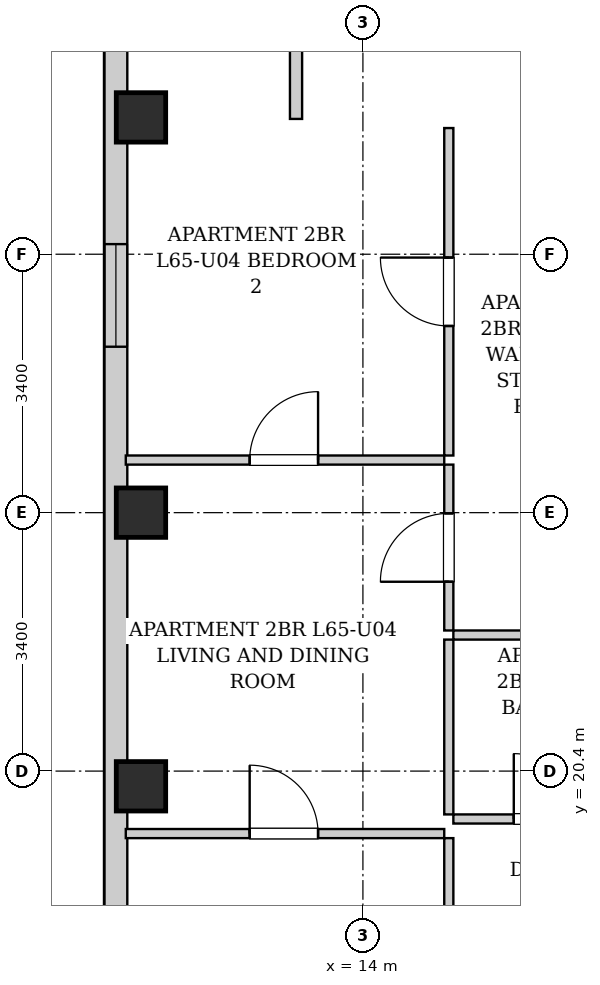
"""IFC4 building model, lengths in metres.
Left out: names, types, materials, properties, quantities, classifications, styles, units other than length and angle.
Written with IfcOpenShell. Run it as: python <this file> out.ifc"""

import sys

from ifc_helpers import new_model, si_unit, direction, frame, frame_2d, origin, origin_2d, place, context, subcontext, project, spatial, rectangle, extrude, element, fill, save


model = new_model("IFC4")
c1 = context("Model", 3, precision=1e-05, world=origin(), true_north=direction((0.0, 1.0)))
c2 = subcontext(c1, "Body", "Model", "MODEL_VIEW")
j1 = project(units=[si_unit("LENGTHUNIT", "METRE"), si_unit("PLANEANGLEUNIT", "RADIAN")], contexts=[c1])
p1 = place(None, origin())
s1 = spatial("IfcSite", under=j1, at=p1, CompositionType="ELEMENT")
p2 = place(p1, origin())
s2 = spatial("IfcBuilding", under=s1, at=p2, CompositionType="ELEMENT")
p3 = place(p2, frame((0.0, 0.0, 224.1)))
s3 = spatial("IfcBuildingStorey", under=s2, at=p3, CompositionType="ELEMENT", Elevation=224.1)
for number, where, z_axis, x_axis in (
    (1, (11.08, 20.2, 0.0), (0.0, 0.0, 1.0), (1.0, 0.0, 0.0)),
    (2, (11.08, 23.8, 0.0), (0.0, 0.0, 1.0), (1.0, 0.0, 0.0)),
    (3, (11.08, 29.0, 0.0), (0.0, 0.0, 1.0), (1.0, 0.0, 0.0)),
):
    element("IfcColumn", number, at=place(p3, frame(where, z_axis=z_axis, x_axis=x_axis)), inside=s3, PredefinedType="COLUMN", context=c2, shape_type="SweptSolid", body=[
        extrude(rectangle(XDim=0.65, YDim=0.65, at=origin_2d()), origin(), (0.0, 0.0, 1.0), 3.4),
    ])
p4 = place(p3, frame((10.75, 6.3, 0.0), z_axis=(0.0, 0.0, 1.0), x_axis=(0.0, 1.0, 0.0)))
e4 = element("IfcWall", 4, at=p4, inside=s3, PredefinedType="SOLIDWALL", context=c2, shape_type="SweptSolid", body=[
    extrude(rectangle(XDim=31.4, YDim=0.3, at=frame_2d((15.7, 0.0))), origin(), (0.0, 0.0, 1.0), 3.14),
])
p5 = place(p4, frame((1.653, 0.0, 0.55)))
e5 = element("IfcOpeningElement", 5, at=p5, cuts=e4, PredefinedType="OPENING", context=c2, shape_type="SweptSolid", body=[
    extrude(rectangle(XDim=1.35, YDim=1.2, at=frame_2d((0.675, 0.6))), frame((0.0, 0.16, 0.0), z_axis=(0.0, -1.0, 0.0), x_axis=(1.0, 0.0, 0.0)), (0.0, 0.0, 1.0), 0.32),
])
p6 = place(p4, frame((10.367, 0.0, 0.55)))
e6 = element("IfcOpeningElement", 6, at=p6, cuts=e4, PredefinedType="OPENING", context=c2, shape_type="SweptSolid", body=[
    extrude(rectangle(XDim=1.35, YDim=1.2, at=frame_2d((0.675, 0.6))), frame((0.0, 0.16, 0.0), z_axis=(0.0, -1.0, 0.0), x_axis=(1.0, 0.0, 0.0)), (0.0, 0.0, 1.0), 0.32),
])
p7 = place(p4, frame((19.683, 0.0, 0.55)))
e7 = element("IfcOpeningElement", 7, at=p7, cuts=e4, PredefinedType="OPENING", context=c2, shape_type="SweptSolid", body=[
    extrude(rectangle(XDim=1.35, YDim=1.2, at=frame_2d((0.675, 0.6))), frame((0.0, 0.16, 0.0), z_axis=(0.0, -1.0, 0.0), x_axis=(1.0, 0.0, 0.0)), (0.0, 0.0, 1.0), 0.32),
])
p8 = place(p3, frame((13.12, 28.98, 0.0), z_axis=(0.0, 0.0, 1.0), x_axis=(0.0, 1.0, 0.0)))
e8 = element("IfcWall", 8, at=p8, inside=s3, PredefinedType="PARTITIONING", context=c2, shape_type="SweptSolid", body=[
    extrude(rectangle(XDim=1.58, YDim=0.16, at=frame_2d((0.79, 0.0))), origin(), (0.0, 0.0, 1.0), 3.14),
])
p9 = place(p3, frame((15.19, 22.19, 0.0), z_axis=(0.0, 0.0, 1.0), x_axis=(1.0, 0.0, 0.0)))
e9 = element("IfcWall", 9, at=p9, inside=s3, PredefinedType="PARTITIONING", context=c2, shape_type="SweptSolid", body=[
    extrude(rectangle(XDim=2.45, YDim=0.12, at=frame_2d((1.225, 0.0))), origin(), (0.0, 0.0, 1.0), 3.14),
])
p10 = place(p3, frame((15.13, 22.25, 0.0), z_axis=(0.0, 0.0, 1.0), x_axis=(0.0, 1.0, 0.0)))
e10 = element("IfcWall", 10, at=p10, inside=s3, PredefinedType="PARTITIONING", context=c2, shape_type="SweptSolid", body=[
    extrude(rectangle(XDim=2.182, YDim=0.12, at=frame_2d((1.091, 0.0))), origin(), (0.0, 0.0, 1.0), 3.14),
])
p11 = place(p10, frame((0.641, 0.0, 0.0)))
e11 = element("IfcOpeningElement", 11, at=p11, cuts=e10, PredefinedType="OPENING", context=c2, shape_type="SweptSolid", body=[
    extrude(rectangle(XDim=0.9, YDim=2.05, at=frame_2d((0.45, 1.025))), frame((0.0, 0.07, 0.0), z_axis=(0.0, -1.0, 0.0), x_axis=(1.0, 0.0, 0.0)), (0.0, 0.0, 1.0), 0.14),
])
p12 = place(p3, frame((15.13, 24.552, 0.0), z_axis=(0.0, 0.0, 1.0), x_axis=(0.0, 1.0, 0.0)))
e12 = element("IfcWall", 12, at=p12, inside=s3, PredefinedType="PARTITIONING", context=c2, shape_type="SweptSolid", body=[
    extrude(rectangle(XDim=4.308, YDim=0.12, at=frame_2d((2.154, 0.0))), origin(), (0.0, 0.0, 1.0), 3.14),
])
p13 = place(p12, frame((1.704, 0.0, 0.0)))
e13 = element("IfcOpeningElement", 13, at=p13, cuts=e12, PredefinedType="OPENING", context=c2, shape_type="SweptSolid", body=[
    extrude(rectangle(XDim=0.9, YDim=2.05, at=frame_2d((0.45, 1.025))), frame((0.0, 0.07, 0.0), z_axis=(0.0, -1.0, 0.0), x_axis=(1.0, 0.0, 0.0)), (0.0, 0.0, 1.0), 0.14),
])
p14 = place(p3, frame((15.19, 19.77, 0.0), z_axis=(0.0, 0.0, 1.0), x_axis=(1.0, 0.0, 0.0)))
e14 = element("IfcWall", 14, at=p14, inside=s3, PredefinedType="PARTITIONING", context=c2, shape_type="SweptSolid", body=[
    extrude(rectangle(XDim=2.45, YDim=0.12, at=frame_2d((1.225, 0.0))), origin(), (0.0, 0.0, 1.0), 3.14),
])
p15 = place(p14, frame((0.795, 0.0, 0.0)))
e15 = element("IfcOpeningElement", 15, at=p15, cuts=e14, PredefinedType="OPENING", context=c2, shape_type="SweptSolid", body=[
    extrude(rectangle(XDim=0.86, YDim=2.05, at=frame_2d((0.43, 1.025))), frame((0.0, 0.07, 0.0), z_axis=(0.0, -1.0, 0.0), x_axis=(1.0, 0.0, 0.0)), (0.0, 0.0, 1.0), 0.14),
])
p16 = place(p3, frame((15.13, 19.83, 0.0), z_axis=(0.0, 0.0, 1.0), x_axis=(0.0, 1.0, 0.0)))
e16 = element("IfcWall", 16, at=p16, inside=s3, PredefinedType="PARTITIONING", context=c2, shape_type="SweptSolid", body=[
    extrude(rectangle(XDim=2.3, YDim=0.12, at=frame_2d((1.15, 0.0))), origin(), (0.0, 0.0, 1.0), 3.14),
])
p17 = place(p3, frame((15.13, 15.21, 0.0), z_axis=(0.0, 0.0, 1.0), x_axis=(0.0, 1.0, 0.0)))
e17 = element("IfcWall", 17, at=p17, inside=s3, PredefinedType="PARTITIONING", context=c2, shape_type="SweptSolid", body=[
    extrude(rectangle(XDim=4.308, YDim=0.12, at=frame_2d((2.154, 0.0))), origin(), (0.0, 0.0, 1.0), 3.14),
])
p18 = place(p17, frame((1.704, 0.0, 0.0)))
e18 = element("IfcOpeningElement", 18, at=p18, cuts=e17, PredefinedType="OPENING", context=c2, shape_type="SweptSolid", body=[
    extrude(rectangle(XDim=0.9, YDim=2.05, at=frame_2d((0.45, 1.025))), frame((0.0, 0.07, 0.0), z_axis=(0.0, -1.0, 0.0), x_axis=(1.0, 0.0, 0.0)), (0.0, 0.0, 1.0), 0.14),
])
p19 = place(p3, frame((10.88, 19.578, 0.0), z_axis=(0.0, 0.0, 1.0), x_axis=(1.0, 0.0, 0.0)))
e19 = element("IfcWall", 19, at=p19, inside=s3, PredefinedType="PARTITIONING", context=c2, shape_type="SweptSolid", body=[
    extrude(rectangle(XDim=4.19, YDim=0.12, at=frame_2d((2.095, 0.0))), origin(), (0.0, 0.0, 1.0), 3.14),
])
p20 = place(p19, frame((1.63, 0.0, 0.0)))
e20 = element("IfcOpeningElement", 20, at=p20, cuts=e19, PredefinedType="OPENING", context=c2, shape_type="SweptSolid", body=[
    extrude(rectangle(XDim=0.9, YDim=2.05, at=frame_2d((0.45, 1.025))), frame((0.0, 0.07, 0.0), z_axis=(0.0, -1.0, 0.0), x_axis=(1.0, 0.0, 0.0)), (0.0, 0.0, 1.0), 0.14),
])
p21 = place(p3, frame((10.88, 24.492, 0.0), z_axis=(0.0, 0.0, 1.0), x_axis=(1.0, 0.0, 0.0)))
e21 = element("IfcWall", 21, at=p21, inside=s3, PredefinedType="PARTITIONING", context=c2, shape_type="SweptSolid", body=[
    extrude(rectangle(XDim=4.19, YDim=0.12, at=frame_2d((2.095, 0.0))), origin(), (0.0, 0.0, 1.0), 2.878),
])
p22 = place(p21, frame((1.63, 0.0, 0.0)))
e22 = element("IfcOpeningElement", 22, at=p22, cuts=e21, PredefinedType="OPENING", context=c2, shape_type="SweptSolid", body=[
    extrude(rectangle(XDim=0.9, YDim=2.05, at=frame_2d((0.45, 1.025))), frame((0.0, 0.07, 0.0), z_axis=(0.0, -1.0, 0.0), x_axis=(1.0, 0.0, 0.0)), (0.0, 0.0, 1.0), 0.14),
])
p23 = place(p11, origin())
e23 = element("IfcDoor", 23, at=p23, inside=s3, OperationType="SINGLE_SWING_LEFT", PredefinedType="DOOR", context=c2, shape_type="SweptSolid", body=[
    extrude(rectangle(XDim=0.9, YDim=2.05, at=frame_2d((0.45, 1.025))), frame((0.0, 0.025, 0.0), z_axis=(0.0, -1.0, 0.0), x_axis=(1.0, 0.0, 0.0)), (0.0, 0.0, 1.0), 0.05),
])
fill(e11, e23)
p24 = place(p13, origin())
e24 = element("IfcDoor", 24, at=p24, inside=s3, OperationType="SINGLE_SWING_RIGHT", PredefinedType="DOOR", context=c2, shape_type="SweptSolid", body=[
    extrude(rectangle(XDim=0.9, YDim=2.05, at=frame_2d((0.45, 1.025))), frame((0.0, 0.025, 0.0), z_axis=(0.0, -1.0, 0.0), x_axis=(1.0, 0.0, 0.0)), (0.0, 0.0, 1.0), 0.05),
])
fill(e13, e24)
p25 = place(p15, origin())
e25 = element("IfcDoor", 25, at=p25, inside=s3, OperationType="SINGLE_SWING_LEFT", PredefinedType="DOOR", context=c2, shape_type="SweptSolid", body=[
    extrude(rectangle(XDim=0.86, YDim=2.05, at=frame_2d((0.43, 1.025))), frame((0.0, 0.025, 0.0), z_axis=(0.0, -1.0, 0.0), x_axis=(1.0, 0.0, 0.0)), (0.0, 0.0, 1.0), 0.05),
])
fill(e15, e25)
p26 = place(p20, origin())
e26 = element("IfcDoor", 26, at=p26, inside=s3, OperationType="SINGLE_SWING_LEFT", PredefinedType="DOOR", context=c2, shape_type="SweptSolid", body=[
    extrude(rectangle(XDim=0.9, YDim=2.05, at=frame_2d((0.45, 1.025))), frame((0.0, 0.025, 0.0), z_axis=(0.0, -1.0, 0.0), x_axis=(1.0, 0.0, 0.0)), (0.0, 0.0, 1.0), 0.05),
])
fill(e20, e26)
p27 = place(p22, origin())
e27 = element("IfcDoor", 27, at=p27, inside=s3, OperationType="SINGLE_SWING_RIGHT", PredefinedType="DOOR", context=c2, shape_type="SweptSolid", body=[
    extrude(rectangle(XDim=0.9, YDim=2.05, at=frame_2d((0.45, 1.025))), frame((0.0, 0.025, 0.0), z_axis=(0.0, -1.0, 0.0), x_axis=(1.0, 0.0, 0.0)), (0.0, 0.0, 1.0), 0.05),
])
fill(e22, e27)
p28 = place(p7, origin())
e28 = element("IfcWindow", 28, at=p28, inside=s3, PartitioningType="SINGLE_PANEL", PredefinedType="WINDOW", context=c2, shape_type="SweptSolid", body=[
    extrude(rectangle(XDim=1.35, YDim=1.2, at=frame_2d((0.675, 0.6))), frame((0.0, 0.03, 0.0), z_axis=(0.0, -1.0, 0.0), x_axis=(1.0, 0.0, 0.0)), (0.0, 0.0, 1.0), 0.06),
])
fill(e7, e28)
save(model, sys.argv[1])
